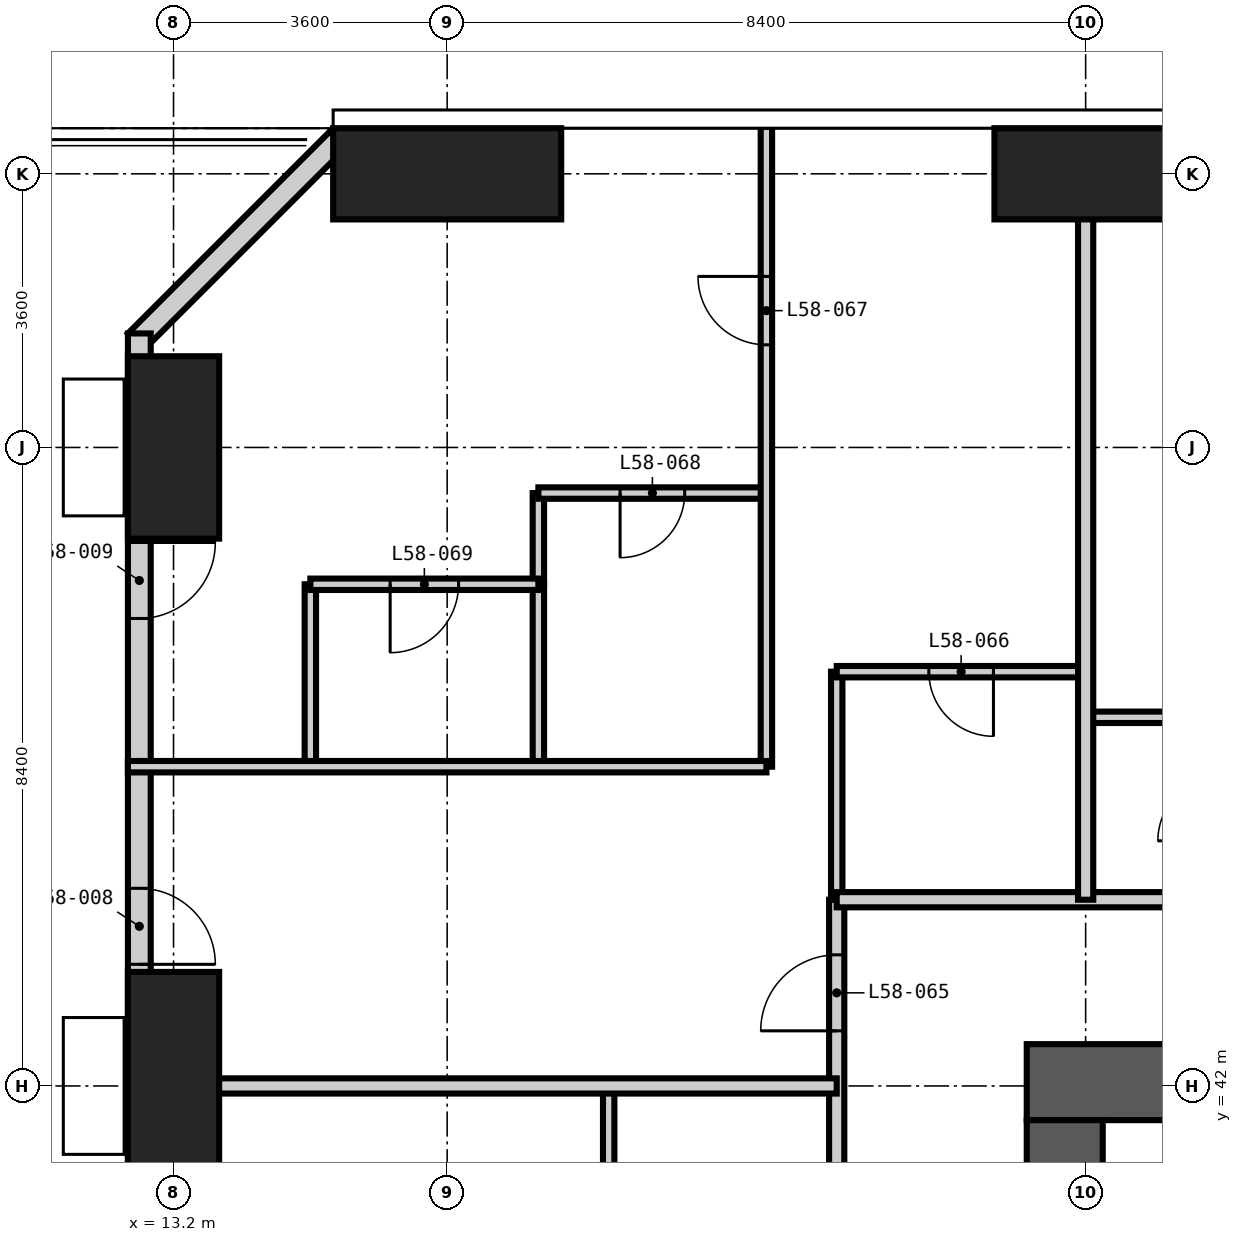
"""IFC4 building model, lengths in metres.
Left out: names, types, materials, properties, quantities, classifications, styles, units other than length and angle.
Written with IfcOpenShell. Run it as: python <this file> out.ifc"""

import sys

from ifc_helpers import new_model, si_unit, direction, frame, frame_2d, origin, origin_2d, place, context, subcontext, project, spatial, rectangle, extrude, element, fill, save


model = new_model("IFC4")
c1 = context("Model", 3, precision=1e-05, world=origin(), true_north=direction((0.0, 1.0)))
c2 = subcontext(c1, "Body", "Model", "MODEL_VIEW")
j1 = project(units=[si_unit("LENGTHUNIT", "METRE"), si_unit("PLANEANGLEUNIT", "RADIAN")], contexts=[c1])
p1 = place(None, origin())
s1 = spatial("IfcSite", under=j1, at=p1, CompositionType="ELEMENT")
p2 = place(p1, origin())
s2 = spatial("IfcBuilding", under=s1, at=p2, CompositionType="ELEMENT")
p3 = place(p2, frame((0.0, 0.0, 225.6)))
s3 = spatial("IfcBuildingStorey", under=s2, at=p3, CompositionType="ELEMENT", Elevation=225.6)
p4 = place(p3, frame((13.2, 42.0, -0.35), z_axis=(0.0, 0.0, 1.0), x_axis=(1.0, 0.0, 0.0)))
e1 = element("IfcColumn", 1, at=p4, inside=s3, PredefinedType="COLUMN", context=c2, shape_type="SweptSolid", body=[
    extrude(rectangle(XDim=1.2, YDim=3.0, at=origin_2d()), origin(), (0.0, 0.0, 1.0), 3.9),
])
p5 = place(p3, frame((13.2, 50.4, -0.35), z_axis=(0.0, 0.0, 1.0), x_axis=(1.0, 0.0, 0.0)))
e2 = element("IfcColumn", 2, at=p5, inside=s3, PredefinedType="COLUMN", context=c2, shape_type="SweptSolid", body=[
    extrude(rectangle(XDim=1.2, YDim=2.4, at=origin_2d()), origin(), (0.0, 0.0, 1.0), 3.9),
])
p6 = place(p3, frame((16.8, 54.0, -0.35), z_axis=(0.0, 0.0, 1.0), x_axis=(1.0, 0.0, 0.0)))
e3 = element("IfcColumn", 3, at=p6, inside=s3, PredefinedType="COLUMN", context=c2, shape_type="SweptSolid", body=[
    extrude(rectangle(XDim=3.0, YDim=1.2, at=origin_2d()), origin(), (0.0, 0.0, 1.0), 3.9),
])
p7 = place(p3, frame((25.2, 54.0, -0.35), z_axis=(0.0, 0.0, 1.0), x_axis=(1.0, 0.0, 0.0)))
e4 = element("IfcColumn", 4, at=p7, inside=s3, PredefinedType="COLUMN", context=c2, shape_type="SweptSolid", body=[
    extrude(rectangle(XDim=2.4, YDim=1.2, at=origin_2d()), origin(), (0.0, 0.0, 1.0), 3.9),
])
p8 = place(p3, frame((42.55, 42.05, -0.35), z_axis=(0.0, 0.0, 1.0), x_axis=(-1.0, 0.0, 0.0)))
e5 = element("IfcWall", 5, at=p8, inside=s3, PredefinedType="SHEAR", context=c2, shape_type="SweptSolid", body=[
    extrude(rectangle(XDim=18.125, YDim=1.0, at=frame_2d((9.062, 0.0))), origin(), (0.0, 0.0, 1.0), 3.9),
])
p9 = place(p8, frame((10.45, 0.0, 0.35)))
e6 = element("IfcOpeningElement", 6, at=p9, cuts=e5, PredefinedType="OPENING", context=c2, shape_type="SweptSolid", body=[
    extrude(rectangle(XDim=1.2, YDim=2.2, at=frame_2d((0.6, 1.1))), frame((0.0, 0.51, 0.0), z_axis=(0.0, -1.0, 0.0), x_axis=(1.0, 0.0, 0.0)), (0.0, 0.0, 1.0), 1.02),
])
p10 = place(p3, frame((24.925, 41.55, -0.35), z_axis=(0.0, 0.0, 1.0), x_axis=(0.0, -1.0, 0.0)))
e7 = element("IfcWall", 7, at=p10, inside=s3, PredefinedType="SHEAR", context=c2, shape_type="SweptSolid", body=[
    extrude(rectangle(XDim=24.3, YDim=1.0, at=frame_2d((12.15, 0.0))), origin(), (0.0, 0.0, 1.0), 3.9),
])
p11 = place(p10, frame((11.65, 0.0, 0.35)))
e8 = element("IfcOpeningElement", 8, at=p11, cuts=e7, PredefinedType="OPENING", context=c2, shape_type="SweptSolid", body=[
    extrude(rectangle(XDim=1.0, YDim=2.1, at=frame_2d((0.5, 1.05))), frame((0.0, 0.51, 0.0), z_axis=(0.0, -1.0, 0.0), x_axis=(1.0, 0.0, 0.0)), (0.0, 0.0, 1.0), 1.02),
])
p12 = place(p3, frame((15.406, 54.494, 0.0), z_axis=(0.0, 0.0, 1.0), x_axis=(-0.707106781187, -0.707106781187, 0.0)))
e9 = element("IfcWall", 9, at=p12, inside=s3, PredefinedType="SOLIDWALL", context=c2, shape_type="SweptSolid", body=[
    extrude(rectangle(XDim=3.818, YDim=0.3, at=frame_2d((1.909, 0.0))), origin(), (0.0, 0.0, 1.0), 3.55),
])
p13 = place(p3, frame((12.75, 51.9, 0.0), z_axis=(0.0, 0.0, 1.0), x_axis=(0.0, -1.0, 0.0)))
e10 = element("IfcWall", 10, at=p13, inside=s3, PredefinedType="SOLIDWALL", context=c2, shape_type="SweptSolid", body=[
    extrude(rectangle(XDim=45.0, YDim=0.3, at=frame_2d((22.5, 0.0))), origin(), (0.0, 0.0, 1.0), 3.1),
])
p14 = place(p13, frame((41.25, 0.0, 0.0)))
e11 = element("IfcOpeningElement", 11, at=p14, cuts=e10, PredefinedType="OPENING", context=c2, shape_type="SweptSolid", body=[
    extrude(rectangle(XDim=1.0, YDim=2.4, at=frame_2d((0.5, 1.2))), frame((0.0, 0.16, 0.0), z_axis=(0.0, -1.0, 0.0), x_axis=(1.0, 0.0, 0.0)), (0.0, 0.0, 1.0), 0.32),
])
p15 = place(p13, frame((36.7, 0.0, 0.0)))
e12 = element("IfcOpeningElement", 12, at=p15, cuts=e10, PredefinedType="OPENING", context=c2, shape_type="SweptSolid", body=[
    extrude(rectangle(XDim=1.0, YDim=2.4, at=frame_2d((0.5, 1.2))), frame((0.0, 0.16, 0.0), z_axis=(0.0, -1.0, 0.0), x_axis=(1.0, 0.0, 0.0)), (0.0, 0.0, 1.0), 0.32),
])
p16 = place(p13, frame((30.4, 0.0, 0.0)))
e13 = element("IfcOpeningElement", 13, at=p16, cuts=e10, PredefinedType="OPENING", context=c2, shape_type="SweptSolid", body=[
    extrude(rectangle(XDim=1.0, YDim=2.4, at=frame_2d((0.5, 1.2))), frame((0.0, 0.16, 0.0), z_axis=(0.0, -1.0, 0.0), x_axis=(1.0, 0.0, 0.0)), (0.0, 0.0, 1.0), 0.32),
])
p17 = place(p13, frame((31.7, 0.0, 0.6)))
e14 = element("IfcOpeningElement", 14, at=p17, cuts=e10, PredefinedType="OPENING", context=c2, shape_type="SweptSolid", body=[
    extrude(rectangle(XDim=1.8, YDim=2.1, at=frame_2d((0.9, 1.05))), frame((0.0, 0.16, 0.0), z_axis=(0.0, -1.0, 0.0), x_axis=(1.0, 0.0, 0.0)), (0.0, 0.0, 1.0), 0.32),
])
p18 = place(p13, frame((28.0, 0.0, 0.6)))
e15 = element("IfcOpeningElement", 15, at=p18, cuts=e10, PredefinedType="OPENING", context=c2, shape_type="SweptSolid", body=[
    extrude(rectangle(XDim=1.8, YDim=2.1, at=frame_2d((0.9, 1.05))), frame((0.0, 0.16, 0.0), z_axis=(0.0, -1.0, 0.0), x_axis=(1.0, 0.0, 0.0)), (0.0, 0.0, 1.0), 0.32),
])
p19 = place(p13, frame((24.1, 0.0, 0.0)))
e16 = element("IfcOpeningElement", 16, at=p19, cuts=e10, PredefinedType="OPENING", context=c2, shape_type="SweptSolid", body=[
    extrude(rectangle(XDim=1.0, YDim=2.4, at=frame_2d((0.5, 1.2))), frame((0.0, 0.16, 0.0), z_axis=(0.0, -1.0, 0.0), x_axis=(1.0, 0.0, 0.0)), (0.0, 0.0, 1.0), 0.32),
])
p20 = place(p13, frame((19.9, 0.0, 0.0)))
e17 = element("IfcOpeningElement", 17, at=p20, cuts=e10, PredefinedType="OPENING", context=c2, shape_type="SweptSolid", body=[
    extrude(rectangle(XDim=1.0, YDim=2.4, at=frame_2d((0.5, 1.2))), frame((0.0, 0.16, 0.0), z_axis=(0.0, -1.0, 0.0), x_axis=(1.0, 0.0, 0.0)), (0.0, 0.0, 1.0), 0.32),
])
p21 = place(p13, frame((15.7, 0.0, 0.0)))
e18 = element("IfcOpeningElement", 18, at=p21, cuts=e10, PredefinedType="OPENING", context=c2, shape_type="SweptSolid", body=[
    extrude(rectangle(XDim=1.0, YDim=2.4, at=frame_2d((0.5, 1.2))), frame((0.0, 0.16, 0.0), z_axis=(0.0, -1.0, 0.0), x_axis=(1.0, 0.0, 0.0)), (0.0, 0.0, 1.0), 0.32),
])
p22 = place(p13, frame((11.5, 0.0, 0.0)))
e19 = element("IfcOpeningElement", 19, at=p22, cuts=e10, PredefinedType="OPENING", context=c2, shape_type="SweptSolid", body=[
    extrude(rectangle(XDim=1.0, YDim=2.4, at=frame_2d((0.5, 1.2))), frame((0.0, 0.16, 0.0), z_axis=(0.0, -1.0, 0.0), x_axis=(1.0, 0.0, 0.0)), (0.0, 0.0, 1.0), 0.32),
])
p23 = place(p13, frame((7.3, 0.0, 0.0)))
e20 = element("IfcOpeningElement", 20, at=p23, cuts=e10, PredefinedType="OPENING", context=c2, shape_type="SweptSolid", body=[
    extrude(rectangle(XDim=1.0, YDim=2.4, at=frame_2d((0.5, 1.2))), frame((0.0, 0.16, 0.0), z_axis=(0.0, -1.0, 0.0), x_axis=(1.0, 0.0, 0.0)), (0.0, 0.0, 1.0), 0.32),
])
p24 = place(p13, frame((2.75, 0.0, 0.0)))
e21 = element("IfcOpeningElement", 21, at=p24, cuts=e10, PredefinedType="OPENING", context=c2, shape_type="SweptSolid", body=[
    extrude(rectangle(XDim=1.0, YDim=2.4, at=frame_2d((0.5, 1.2))), frame((0.0, 0.16, 0.0), z_axis=(0.0, -1.0, 0.0), x_axis=(1.0, 0.0, 0.0)), (0.0, 0.0, 1.0), 0.32),
])
p25 = place(p3, frame((18.0, 48.6, 0.0), z_axis=(0.0, 0.0, 1.0), x_axis=(0.0, 1.0, 0.0)))
e22 = element("IfcWall", 22, at=p25, inside=s3, PredefinedType="PARTITIONING", context=c2, shape_type="SweptSolid", body=[
    extrude(rectangle(XDim=1.2, YDim=0.15, at=frame_2d((0.6, 0.0))), origin(), (0.0, 0.0, 1.0), 3.55),
])
p26 = place(p3, frame((18.925, 39.6, 0.0), z_axis=(0.0, 0.0, 1.0), x_axis=(0.0, 1.0, 0.0)))
e23 = element("IfcWall", 23, at=p26, inside=s3, PredefinedType="PARTITIONING", context=c2, shape_type="SweptSolid", body=[
    extrude(rectangle(XDim=2.4, YDim=0.15, at=frame_2d((1.2, 0.0))), origin(), (0.0, 0.0, 1.0), 3.55),
])
p27 = place(p3, frame((21.925, 44.45, 0.0), z_axis=(0.0, 0.0, 1.0), x_axis=(0.0, 1.0, 0.0)))
e24 = element("IfcWall", 24, at=p27, inside=s3, PredefinedType="PARTITIONING", context=c2, shape_type="SweptSolid", body=[
    extrude(rectangle(XDim=3.0, YDim=0.15, at=frame_2d((1.5, 0.0))), origin(), (0.0, 0.0, 1.0), 3.55),
])
p28 = place(p3, frame((25.2, 46.85, 0.0), z_axis=(0.0, 0.0, 1.0), x_axis=(1.0, 0.0, 0.0)))
e25 = element("IfcWall", 25, at=p28, inside=s3, PredefinedType="PARTITIONING", context=c2, shape_type="SweptSolid", body=[
    extrude(rectangle(XDim=1.8, YDim=0.15, at=frame_2d((0.9, 0.0))), origin(), (0.0, 0.0, 1.0), 3.55),
])
p29 = place(p3, frame((21.925, 47.45, 0.0), z_axis=(0.0, 0.0, 1.0), x_axis=(1.0, 0.0, 0.0)))
e26 = element("IfcWall", 26, at=p29, inside=s3, PredefinedType="PARTITIONING", context=c2, shape_type="SweptSolid", body=[
    extrude(rectangle(XDim=3.275, YDim=0.15, at=frame_2d((1.637, 0.0))), origin(), (0.0, 0.0, 1.0), 3.55),
])
p30 = place(p29, frame((1.212, 0.0, 0.0)))
e27 = element("IfcOpeningElement", 27, at=p30, cuts=e26, PredefinedType="OPENING", context=c2, shape_type="SweptSolid", body=[
    extrude(rectangle(XDim=0.85, YDim=2.1, at=frame_2d((0.425, 1.05))), frame((0.0, 0.085, 0.0), z_axis=(0.0, -1.0, 0.0), x_axis=(1.0, 0.0, 0.0)), (0.0, 0.0, 1.0), 0.17),
])
p31 = place(p3, frame((18.0, 49.8, 0.0), z_axis=(0.0, 0.0, 1.0), x_axis=(1.0, 0.0, 0.0)))
e28 = element("IfcWall", 28, at=p31, inside=s3, PredefinedType="PARTITIONING", context=c2, shape_type="SweptSolid", body=[
    extrude(rectangle(XDim=3.0, YDim=0.15, at=frame_2d((1.5, 0.0))), origin(), (0.0, 0.0, 1.0), 3.55),
])
p32 = place(p31, frame((1.075, 0.0, 0.0)))
e29 = element("IfcOpeningElement", 29, at=p32, cuts=e28, PredefinedType="OPENING", context=c2, shape_type="SweptSolid", body=[
    extrude(rectangle(XDim=0.85, YDim=2.1, at=frame_2d((0.425, 1.05))), frame((0.0, 0.085, 0.0), z_axis=(0.0, -1.0, 0.0), x_axis=(1.0, 0.0, 0.0)), (0.0, 0.0, 1.0), 0.17),
])
p33 = place(p3, frame((21.925, 25.2, 0.0), z_axis=(0.0, 0.0, 1.0), x_axis=(0.0, 1.0, 0.0)))
e30 = element("IfcWall", 30, at=p33, inside=s3, PredefinedType="PARTITIONING", context=c2, shape_type="SweptSolid", body=[
    extrude(rectangle(XDim=19.25, YDim=0.2, at=frame_2d((9.625, 0.0))), origin(), (0.0, 0.0, 1.0), 3.55),
])
p34 = place(p33, frame((4.9, 0.0, 0.0)))
e31 = element("IfcOpeningElement", 31, at=p34, cuts=e30, PredefinedType="OPENING", context=c2, shape_type="SweptSolid", body=[
    extrude(rectangle(XDim=1.0, YDim=2.2, at=frame_2d((0.5, 1.1))), frame((0.0, 0.11, 0.0), z_axis=(0.0, -1.0, 0.0), x_axis=(1.0, 0.0, 0.0)), (0.0, 0.0, 1.0), 0.22),
])
p35 = place(p33, frame((10.9, 0.0, 0.0)))
e32 = element("IfcOpeningElement", 32, at=p35, cuts=e30, PredefinedType="OPENING", context=c2, shape_type="SweptSolid", body=[
    extrude(rectangle(XDim=1.0, YDim=2.2, at=frame_2d((0.5, 1.1))), frame((0.0, 0.11, 0.0), z_axis=(0.0, -1.0, 0.0), x_axis=(1.0, 0.0, 0.0)), (0.0, 0.0, 1.0), 0.22),
])
p36 = place(p33, frame((17.525, 0.0, 0.0)))
e33 = element("IfcOpeningElement", 33, at=p36, cuts=e30, PredefinedType="OPENING", context=c2, shape_type="SweptSolid", body=[
    extrude(rectangle(XDim=1.0, YDim=2.2, at=frame_2d((0.5, 1.1))), frame((0.0, 0.11, 0.0), z_axis=(0.0, -1.0, 0.0), x_axis=(1.0, 0.0, 0.0)), (0.0, 0.0, 1.0), 0.22),
])
p37 = place(p3, frame((21.925, 44.45, 0.0), z_axis=(0.0, 0.0, 1.0), x_axis=(1.0, 0.0, 0.0)))
e34 = element("IfcWall", 34, at=p37, inside=s3, PredefinedType="PARTITIONING", context=c2, shape_type="SweptSolid", body=[
    extrude(rectangle(XDim=23.725, YDim=0.2, at=frame_2d((11.862, 0.0))), origin(), (0.0, 0.0, 1.0), 3.55),
])
p38 = place(p37, frame((5.775, 0.0, 0.0)))
e35 = element("IfcOpeningElement", 35, at=p38, cuts=e34, PredefinedType="OPENING", context=c2, shape_type="SweptSolid", body=[
    extrude(rectangle(XDim=1.0, YDim=2.2, at=frame_2d((0.5, 1.1))), frame((0.0, 0.11, 0.0), z_axis=(0.0, -1.0, 0.0), x_axis=(1.0, 0.0, 0.0)), (0.0, 0.0, 1.0), 0.22),
])
p39 = place(p37, frame((16.575, 0.0, 0.0)))
e36 = element("IfcOpeningElement", 36, at=p39, cuts=e34, PredefinedType="OPENING", context=c2, shape_type="SweptSolid", body=[
    extrude(rectangle(XDim=1.0, YDim=2.2, at=frame_2d((0.5, 1.1))), frame((0.0, 0.11, 0.0), z_axis=(0.0, -1.0, 0.0), x_axis=(1.0, 0.0, 0.0)), (0.0, 0.0, 1.0), 0.22),
])
p40 = place(p3, frame((25.2, 44.45, 0.0), z_axis=(0.0, 0.0, 1.0), x_axis=(0.0, 1.0, 0.0)))
e37 = element("IfcWall", 37, at=p40, inside=s3, PredefinedType="PARTITIONING", context=c2, shape_type="SweptSolid", body=[
    extrude(rectangle(XDim=10.168, YDim=0.2, at=frame_2d((5.084, 0.0))), origin(), (0.0, 0.0, 1.0), 3.55),
])
p41 = place(p3, frame((12.6, 42.0, 0.0), z_axis=(0.0, 0.0, 1.0), x_axis=(1.0, 0.0, 0.0)))
e38 = element("IfcWall", 38, at=p41, inside=s3, PredefinedType="PARTITIONING", context=c2, shape_type="SweptSolid", body=[
    extrude(rectangle(XDim=9.325, YDim=0.2, at=frame_2d((4.663, 0.0))), origin(), (0.0, 0.0, 1.0), 3.55),
])
for number, where, z_axis, x_axis in (
    (39, (15.0, 46.2, 0.0), (0.0, 0.0, 1.0), (0.0, 1.0, 0.0)),
    (40, (18.0, 46.2, 0.0), (0.0, 0.0, 1.0), (0.0, 1.0, 0.0)),
):
    element("IfcWall", number, at=place(p3, frame(where, z_axis=z_axis, x_axis=x_axis)), inside=s3, PredefinedType="PARTITIONING", context=c2, shape_type="SweptSolid", body=[
        extrude(rectangle(XDim=2.4, YDim=0.15, at=frame_2d((1.2, 0.0))), origin(), (0.0, 0.0, 1.0), 3.55),
    ])
p42 = place(p3, frame((21.0, 46.2, 0.0), z_axis=(0.0, 0.0, 1.0), x_axis=(0.0, 1.0, 0.0)))
e41 = element("IfcWall", 41, at=p42, inside=s3, PredefinedType="PARTITIONING", context=c2, shape_type="SweptSolid", body=[
    extrude(rectangle(XDim=8.418, YDim=0.15, at=frame_2d((4.209, 0.0))), origin(), (0.0, 0.0, 1.0), 3.55),
])
p43 = place(p42, frame((5.55, 0.0, 0.0)))
e42 = element("IfcOpeningElement", 42, at=p43, cuts=e41, PredefinedType="OPENING", context=c2, shape_type="SweptSolid", body=[
    extrude(rectangle(XDim=0.9, YDim=2.1, at=frame_2d((0.45, 1.05))), frame((0.0, 0.085, 0.0), z_axis=(0.0, -1.0, 0.0), x_axis=(1.0, 0.0, 0.0)), (0.0, 0.0, 1.0), 0.17),
])
p44 = place(p3, frame((12.6, 46.2, 0.0), z_axis=(0.0, 0.0, 1.0), x_axis=(1.0, 0.0, 0.0)))
e43 = element("IfcWall", 43, at=p44, inside=s3, PredefinedType="PARTITIONING", context=c2, shape_type="SweptSolid", body=[
    extrude(rectangle(XDim=8.4, YDim=0.15, at=frame_2d((4.2, 0.0))), origin(), (0.0, 0.0, 1.0), 3.55),
])
p45 = place(p3, frame((15.0, 48.6, 0.0), z_axis=(0.0, 0.0, 1.0), x_axis=(1.0, 0.0, 0.0)))
e44 = element("IfcWall", 44, at=p45, inside=s3, PredefinedType="PARTITIONING", context=c2, shape_type="SweptSolid", body=[
    extrude(rectangle(XDim=3.0, YDim=0.15, at=frame_2d((1.5, 0.0))), origin(), (0.0, 0.0, 1.0), 3.55),
])
p46 = place(p45, frame((1.05, 0.0, 0.0)))
e45 = element("IfcOpeningElement", 45, at=p46, cuts=e44, PredefinedType="OPENING", context=c2, shape_type="SweptSolid", body=[
    extrude(rectangle(XDim=0.9, YDim=2.1, at=frame_2d((0.45, 1.05))), frame((0.0, 0.085, 0.0), z_axis=(0.0, -1.0, 0.0), x_axis=(1.0, 0.0, 0.0)), (0.0, 0.0, 1.0), 0.17),
])
p47 = place(p23, origin())
e46 = element("IfcDoor", 46, at=p47, inside=s3, OperationType="SINGLE_SWING_RIGHT", PredefinedType="DOOR", context=c2, shape_type="SweptSolid", body=[
    extrude(rectangle(XDim=1.0, YDim=2.4, at=frame_2d((0.5, 1.2))), frame((0.0, 0.025, 0.0), z_axis=(0.0, -1.0, 0.0), x_axis=(1.0, 0.0, 0.0)), (0.0, 0.0, 1.0), 0.05),
])
fill(e20, e46)
p48 = place(p24, origin())
e47 = element("IfcDoor", 47, at=p48, inside=s3, OperationType="SINGLE_SWING_LEFT", PredefinedType="DOOR", context=c2, shape_type="SweptSolid", body=[
    extrude(rectangle(XDim=1.0, YDim=2.4, at=frame_2d((0.5, 1.2))), frame((0.0, 0.025, 0.0), z_axis=(0.0, -1.0, 0.0), x_axis=(1.0, 0.0, 0.0)), (0.0, 0.0, 1.0), 0.05),
])
fill(e21, e47)
p49 = place(p36, origin())
e48 = element("IfcDoor", 48, at=p49, inside=s3, OperationType="SINGLE_SWING_LEFT", PredefinedType="DOOR", context=c2, shape_type="SweptSolid", body=[
    extrude(rectangle(XDim=1.0, YDim=2.2, at=frame_2d((0.5, 1.1))), frame((0.0, 0.025, 0.0), z_axis=(0.0, -1.0, 0.0), x_axis=(1.0, 0.0, 0.0)), (0.0, 0.0, 1.0), 0.05),
])
fill(e33, e48)
p50 = place(p30, frame((0.85, 0.0, 0.0), z_axis=(0.0, 0.0, 1.0), x_axis=(-1.0, 0.0, 0.0)))
e49 = element("IfcDoor", 49, at=p50, inside=s3, OperationType="SINGLE_SWING_LEFT", PredefinedType="DOOR", context=c2, shape_type="SweptSolid", body=[
    extrude(rectangle(XDim=0.85, YDim=2.1, at=frame_2d((0.425, 1.05))), frame((0.0, 0.025, 0.0), z_axis=(0.0, -1.0, 0.0), x_axis=(1.0, 0.0, 0.0)), (0.0, 0.0, 1.0), 0.05),
])
fill(e27, e49)
p51 = place(p43, origin())
e50 = element("IfcDoor", 50, at=p51, inside=s3, OperationType="SINGLE_SWING_RIGHT", PredefinedType="DOOR", context=c2, shape_type="SweptSolid", body=[
    extrude(rectangle(XDim=0.9, YDim=2.1, at=frame_2d((0.45, 1.05))), frame((0.0, 0.025, 0.0), z_axis=(0.0, -1.0, 0.0), x_axis=(1.0, 0.0, 0.0)), (0.0, 0.0, 1.0), 0.05),
])
fill(e42, e50)
p52 = place(p32, frame((0.85, 0.0, 0.0), z_axis=(0.0, 0.0, 1.0), x_axis=(-1.0, 0.0, 0.0)))
e51 = element("IfcDoor", 51, at=p52, inside=s3, OperationType="SINGLE_SWING_RIGHT", PredefinedType="DOOR", context=c2, shape_type="SweptSolid", body=[
    extrude(rectangle(XDim=0.85, YDim=2.1, at=frame_2d((0.425, 1.05))), frame((0.0, 0.025, 0.0), z_axis=(0.0, -1.0, 0.0), x_axis=(1.0, 0.0, 0.0)), (0.0, 0.0, 1.0), 0.05),
])
fill(e29, e51)
p53 = place(p46, frame((0.9, 0.0, 0.0), z_axis=(0.0, 0.0, 1.0), x_axis=(-1.0, 0.0, 0.0)))
e52 = element("IfcDoor", 52, at=p53, inside=s3, OperationType="SINGLE_SWING_RIGHT", PredefinedType="DOOR", context=c2, shape_type="SweptSolid", body=[
    extrude(rectangle(XDim=0.9, YDim=2.1, at=frame_2d((0.45, 1.05))), frame((0.0, 0.025, 0.0), z_axis=(0.0, -1.0, 0.0), x_axis=(1.0, 0.0, 0.0)), (0.0, 0.0, 1.0), 0.05),
])
fill(e45, e52)
save(model, sys.argv[1])
